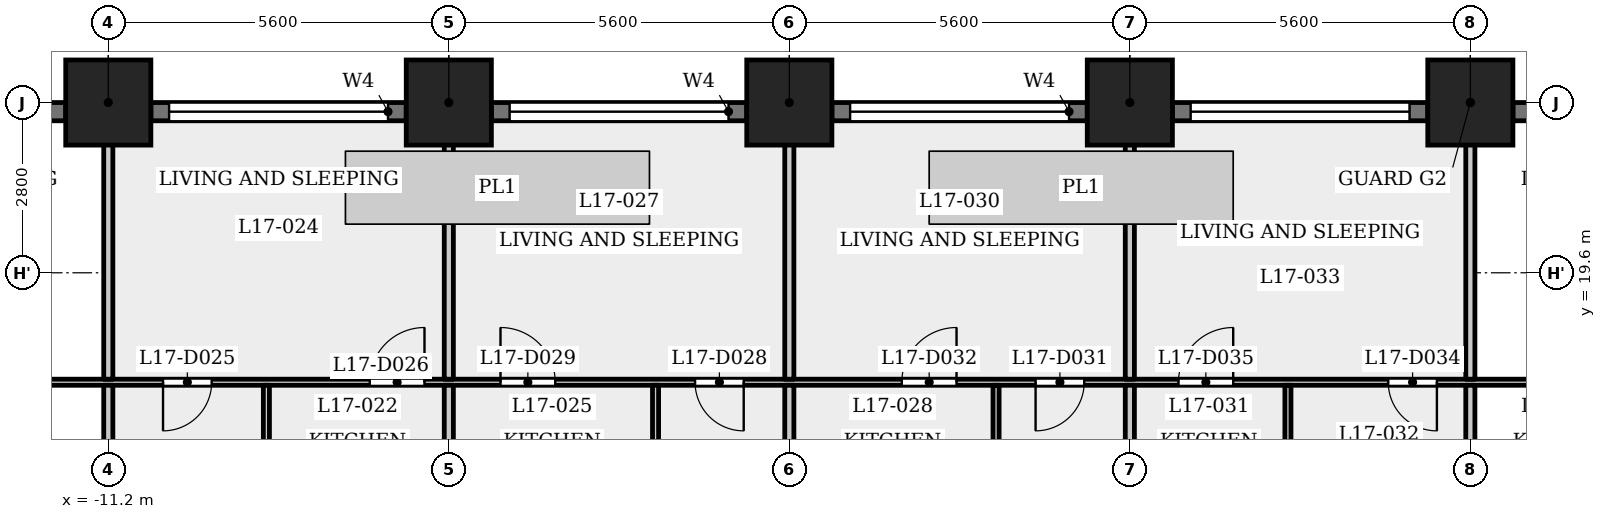
"""IFC4 building model, lengths in metres.
Left out: names, types, materials, properties, quantities, classifications, styles, units other than length and angle.
Written with IfcOpenShell. Run it as: python <this file> out.ifc"""

import sys

from ifc_helpers import new_model, si_unit, direction, frame, frame_2d, origin, origin_2d, place, context, subcontext, project, spatial, rectangle, extrude, element, fill, save


model = new_model("IFC4")
c1 = context("Model", 3, precision=1e-05, world=origin(), true_north=direction((0.0, 1.0)))
c2 = subcontext(c1, "Body", "Model", "MODEL_VIEW")
j1 = project(units=[si_unit("LENGTHUNIT", "METRE"), si_unit("PLANEANGLEUNIT", "RADIAN")], contexts=[c1])
p1 = place(None, origin())
s1 = spatial("IfcSite", under=j1, at=p1, CompositionType="ELEMENT")
p2 = place(p1, origin())
s2 = spatial("IfcBuilding", under=s1, at=p2, CompositionType="ELEMENT")
p3 = place(p2, frame((0.0, 0.0, 69.0)))
s3 = spatial("IfcBuildingStorey", under=s2, at=p3, CompositionType="ELEMENT", Elevation=69.0)
for number, where, z_axis, x_axis in (
    (1, (11.2, 22.4, 0.0), (0.0, 0.0, 1.0), (1.0, 0.0, 0.0)),
    (2, (5.6, 22.4, 0.0), (0.0, 0.0, 1.0), (1.0, 0.0, 0.0)),
    (3, (0.0, 22.4, 0.0), (0.0, 0.0, 1.0), (1.0, 0.0, 0.0)),
    (4, (-5.6, 22.4, 0.0), (0.0, 0.0, 1.0), (1.0, 0.0, 0.0)),
    (5, (-11.2, 22.4, 0.0), (0.0, 0.0, 1.0), (1.0, 0.0, 0.0)),
):
    element("IfcColumn", number, at=place(p3, frame(where, z_axis=z_axis, x_axis=x_axis)), inside=s3, PredefinedType="COLUMN", context=c2, shape_type="SweptSolid", body=[
        extrude(rectangle(XDim=1.4, YDim=1.4, at=origin_2d()), origin(), (0.0, 0.0, 1.0), 3.5),
    ])
p4 = place(p3, frame((16.1, 22.25, 0.0), z_axis=(0.0, 0.0, 1.0), x_axis=(-1.0, 0.0, 0.0)))
e6 = element("IfcWall", 6, at=p4, inside=s3, PredefinedType="SOLIDWALL", context=c2, shape_type="SweptSolid", body=[
    extrude(rectangle(XDim=4.2, YDim=0.3, at=frame_2d((2.1, 0.0))), origin(), (0.0, 0.0, 1.0), 2.3),
])
p5 = place(p4, frame((0.3, 0.0, 1.2)))
e7 = element("IfcOpeningElement", 7, at=p5, cuts=e6, PredefinedType="OPENING", context=c2, shape_type="SweptSolid", body=[
    extrude(rectangle(XDim=3.6, YDim=0.95, at=frame_2d((1.8, 0.475))), frame((0.0, 0.16, 0.0), z_axis=(0.0, -1.0, 0.0), x_axis=(1.0, 0.0, 0.0)), (0.0, 0.0, 1.0), 0.32),
])
p6 = place(p3, frame((10.5, 22.25, 0.0), z_axis=(0.0, 0.0, 1.0), x_axis=(-1.0, 0.0, 0.0)))
e8 = element("IfcWall", 8, at=p6, inside=s3, PredefinedType="SOLIDWALL", context=c2, shape_type="SweptSolid", body=[
    extrude(rectangle(XDim=4.2, YDim=0.3, at=frame_2d((2.1, 0.0))), origin(), (0.0, 0.0, 1.0), 2.3),
])
p7 = place(p6, frame((0.3, 0.0, 1.2)))
e9 = element("IfcOpeningElement", 9, at=p7, cuts=e8, PredefinedType="OPENING", context=c2, shape_type="SweptSolid", body=[
    extrude(rectangle(XDim=3.6, YDim=0.95, at=frame_2d((1.8, 0.475))), frame((0.0, 0.16, 0.0), z_axis=(0.0, -1.0, 0.0), x_axis=(1.0, 0.0, 0.0)), (0.0, 0.0, 1.0), 0.32),
])
p8 = place(p3, frame((4.9, 22.25, 0.0), z_axis=(0.0, 0.0, 1.0), x_axis=(-1.0, 0.0, 0.0)))
e10 = element("IfcWall", 10, at=p8, inside=s3, PredefinedType="SOLIDWALL", context=c2, shape_type="SweptSolid", body=[
    extrude(rectangle(XDim=4.2, YDim=0.3, at=frame_2d((2.1, 0.0))), origin(), (0.0, 0.0, 1.0), 2.3),
])
p9 = place(p8, frame((0.3, 0.0, 1.2)))
e11 = element("IfcOpeningElement", 11, at=p9, cuts=e10, PredefinedType="OPENING", context=c2, shape_type="SweptSolid", body=[
    extrude(rectangle(XDim=3.6, YDim=0.95, at=frame_2d((1.8, 0.475))), frame((0.0, 0.16, 0.0), z_axis=(0.0, -1.0, 0.0), x_axis=(1.0, 0.0, 0.0)), (0.0, 0.0, 1.0), 0.32),
])
p10 = place(p3, frame((-0.7, 22.25, 0.0), z_axis=(0.0, 0.0, 1.0), x_axis=(-1.0, 0.0, 0.0)))
e12 = element("IfcWall", 12, at=p10, inside=s3, PredefinedType="SOLIDWALL", context=c2, shape_type="SweptSolid", body=[
    extrude(rectangle(XDim=4.2, YDim=0.3, at=frame_2d((2.1, 0.0))), origin(), (0.0, 0.0, 1.0), 2.3),
])
p11 = place(p10, frame((0.3, 0.0, 1.2)))
e13 = element("IfcOpeningElement", 13, at=p11, cuts=e12, PredefinedType="OPENING", context=c2, shape_type="SweptSolid", body=[
    extrude(rectangle(XDim=3.6, YDim=0.95, at=frame_2d((1.8, 0.475))), frame((0.0, 0.16, 0.0), z_axis=(0.0, -1.0, 0.0), x_axis=(1.0, 0.0, 0.0)), (0.0, 0.0, 1.0), 0.32),
])
p12 = place(p3, frame((-6.3, 22.25, 0.0), z_axis=(0.0, 0.0, 1.0), x_axis=(-1.0, 0.0, 0.0)))
e14 = element("IfcWall", 14, at=p12, inside=s3, PredefinedType="SOLIDWALL", context=c2, shape_type="SweptSolid", body=[
    extrude(rectangle(XDim=4.2, YDim=0.3, at=frame_2d((2.1, 0.0))), origin(), (0.0, 0.0, 1.0), 2.3),
])
p13 = place(p12, frame((0.3, 0.0, 1.2)))
e15 = element("IfcOpeningElement", 15, at=p13, cuts=e14, PredefinedType="OPENING", context=c2, shape_type="SweptSolid", body=[
    extrude(rectangle(XDim=3.6, YDim=0.95, at=frame_2d((1.8, 0.475))), frame((0.0, 0.16, 0.0), z_axis=(0.0, -1.0, 0.0), x_axis=(1.0, 0.0, 0.0)), (0.0, 0.0, 1.0), 0.32),
])
p14 = place(p3, frame((-11.9, 22.25, 0.0), z_axis=(0.0, 0.0, 1.0), x_axis=(-1.0, 0.0, 0.0)))
e16 = element("IfcWall", 16, at=p14, inside=s3, PredefinedType="SOLIDWALL", context=c2, shape_type="SweptSolid", body=[
    extrude(rectangle(XDim=4.2, YDim=0.3, at=frame_2d((2.1, 0.0))), origin(), (0.0, 0.0, 1.0), 2.3),
])
p15 = place(p14, frame((0.3, 0.0, 1.2)))
e17 = element("IfcOpeningElement", 17, at=p15, cuts=e16, PredefinedType="OPENING", context=c2, shape_type="SweptSolid", body=[
    extrude(rectangle(XDim=3.6, YDim=0.95, at=frame_2d((1.8, 0.475))), frame((0.0, 0.16, 0.0), z_axis=(0.0, -1.0, 0.0), x_axis=(1.0, 0.0, 0.0)), (0.0, 0.0, 1.0), 0.32),
])
p16 = place(p3, frame((-26.64, 17.8, 0.0), z_axis=(0.0, 0.0, 1.0), x_axis=(1.0, 0.0, 0.0)))
e18 = element("IfcWall", 18, at=p16, inside=s3, PredefinedType="PARTITIONING", context=c2, shape_type="SweptSolid", body=[
    extrude(rectangle(XDim=53.034, YDim=0.1, at=frame_2d((26.517, 0.0))), origin(), (0.0, 0.0, 1.0), 3.15),
])
p17 = place(p16, frame((2.872, 0.0, 0.0)))
e19 = element("IfcOpeningElement", 19, at=p17, cuts=e18, PredefinedType="OPENING", context=c2, shape_type="SweptSolid", body=[
    extrude(rectangle(XDim=0.8, YDim=2.1, at=frame_2d((0.4, 1.05))), frame((0.0, 0.06, 0.0), z_axis=(0.0, -1.0, 0.0), x_axis=(1.0, 0.0, 0.0)), (0.0, 0.0, 1.0), 0.12),
])
p18 = place(p16, frame((7.04, 0.0, 0.0)))
e20 = element("IfcOpeningElement", 20, at=p18, cuts=e18, PredefinedType="OPENING", context=c2, shape_type="SweptSolid", body=[
    extrude(rectangle(XDim=0.9, YDim=2.1, at=frame_2d((0.45, 1.05))), frame((0.0, 0.06, 0.0), z_axis=(0.0, -1.0, 0.0), x_axis=(1.0, 0.0, 0.0)), (0.0, 0.0, 1.0), 0.12),
])
p19 = place(p16, frame((10.74, 0.0, 0.0)))
e21 = element("IfcOpeningElement", 21, at=p19, cuts=e18, PredefinedType="OPENING", context=c2, shape_type="SweptSolid", body=[
    extrude(rectangle(XDim=0.8, YDim=2.1, at=frame_2d((0.4, 1.05))), frame((0.0, 0.06, 0.0), z_axis=(0.0, -1.0, 0.0), x_axis=(1.0, 0.0, 0.0)), (0.0, 0.0, 1.0), 0.12),
])
p20 = place(p16, frame((12.89, 0.0, 0.0)))
e22 = element("IfcOpeningElement", 22, at=p20, cuts=e18, PredefinedType="OPENING", context=c2, shape_type="SweptSolid", body=[
    extrude(rectangle(XDim=0.9, YDim=2.1, at=frame_2d((0.45, 1.05))), frame((0.0, 0.06, 0.0), z_axis=(0.0, -1.0, 0.0), x_axis=(1.0, 0.0, 0.0)), (0.0, 0.0, 1.0), 0.12),
])
p21 = place(p16, frame((16.34, 0.0, 0.0)))
e23 = element("IfcOpeningElement", 23, at=p21, cuts=e18, PredefinedType="OPENING", context=c2, shape_type="SweptSolid", body=[
    extrude(rectangle(XDim=0.8, YDim=2.1, at=frame_2d((0.4, 1.05))), frame((0.0, 0.06, 0.0), z_axis=(0.0, -1.0, 0.0), x_axis=(1.0, 0.0, 0.0)), (0.0, 0.0, 1.0), 0.12),
])
p22 = place(p16, frame((19.74, 0.0, 0.0)))
e24 = element("IfcOpeningElement", 24, at=p22, cuts=e18, PredefinedType="OPENING", context=c2, shape_type="SweptSolid", body=[
    extrude(rectangle(XDim=0.9, YDim=2.1, at=frame_2d((0.45, 1.05))), frame((0.0, 0.06, 0.0), z_axis=(0.0, -1.0, 0.0), x_axis=(1.0, 0.0, 0.0)), (0.0, 0.0, 1.0), 0.12),
])
p23 = place(p16, frame((25.09, 0.0, 0.0)))
e25 = element("IfcOpeningElement", 25, at=p23, cuts=e18, PredefinedType="OPENING", context=c2, shape_type="SweptSolid", body=[
    extrude(rectangle(XDim=0.8, YDim=2.1, at=frame_2d((0.4, 1.05))), frame((0.0, 0.06, 0.0), z_axis=(0.0, -1.0, 0.0), x_axis=(1.0, 0.0, 0.0)), (0.0, 0.0, 1.0), 0.12),
])
p24 = place(p16, frame((21.89, 0.0, 0.0)))
e26 = element("IfcOpeningElement", 26, at=p24, cuts=e18, PredefinedType="OPENING", context=c2, shape_type="SweptSolid", body=[
    extrude(rectangle(XDim=0.9, YDim=2.1, at=frame_2d((0.45, 1.05))), frame((0.0, 0.06, 0.0), z_axis=(0.0, -1.0, 0.0), x_axis=(1.0, 0.0, 0.0)), (0.0, 0.0, 1.0), 0.12),
])
p25 = place(p16, frame((30.69, 0.0, 0.0)))
e27 = element("IfcOpeningElement", 27, at=p25, cuts=e18, PredefinedType="OPENING", context=c2, shape_type="SweptSolid", body=[
    extrude(rectangle(XDim=0.8, YDim=2.1, at=frame_2d((0.4, 1.05))), frame((0.0, 0.06, 0.0), z_axis=(0.0, -1.0, 0.0), x_axis=(1.0, 0.0, 0.0)), (0.0, 0.0, 1.0), 0.12),
])
p26 = place(p16, frame((28.49, 0.0, 0.0)))
e28 = element("IfcOpeningElement", 28, at=p26, cuts=e18, PredefinedType="OPENING", context=c2, shape_type="SweptSolid", body=[
    extrude(rectangle(XDim=0.9, YDim=2.1, at=frame_2d((0.45, 1.05))), frame((0.0, 0.06, 0.0), z_axis=(0.0, -1.0, 0.0), x_axis=(1.0, 0.0, 0.0)), (0.0, 0.0, 1.0), 0.12),
])
p27 = place(p16, frame((36.49, 0.0, 0.0)))
e29 = element("IfcOpeningElement", 29, at=p27, cuts=e18, PredefinedType="OPENING", context=c2, shape_type="SweptSolid", body=[
    extrude(rectangle(XDim=0.8, YDim=2.1, at=frame_2d((0.4, 1.05))), frame((0.0, 0.06, 0.0), z_axis=(0.0, -1.0, 0.0), x_axis=(1.0, 0.0, 0.0)), (0.0, 0.0, 1.0), 0.12),
])
p28 = place(p16, frame((33.04, 0.0, 0.0)))
e30 = element("IfcOpeningElement", 30, at=p28, cuts=e18, PredefinedType="OPENING", context=c2, shape_type="SweptSolid", body=[
    extrude(rectangle(XDim=0.9, YDim=2.1, at=frame_2d((0.45, 1.05))), frame((0.0, 0.06, 0.0), z_axis=(0.0, -1.0, 0.0), x_axis=(1.0, 0.0, 0.0)), (0.0, 0.0, 1.0), 0.12),
])
p29 = place(p16, frame((41.49, 0.0, 0.0)))
e31 = element("IfcOpeningElement", 31, at=p29, cuts=e18, PredefinedType="OPENING", context=c2, shape_type="SweptSolid", body=[
    extrude(rectangle(XDim=0.8, YDim=2.1, at=frame_2d((0.4, 1.05))), frame((0.0, 0.06, 0.0), z_axis=(0.0, -1.0, 0.0), x_axis=(1.0, 0.0, 0.0)), (0.0, 0.0, 1.0), 0.12),
])
p30 = place(p16, frame((39.79, 0.0, 0.0)))
e32 = element("IfcOpeningElement", 32, at=p30, cuts=e18, PredefinedType="OPENING", context=c2, shape_type="SweptSolid", body=[
    extrude(rectangle(XDim=0.9, YDim=2.1, at=frame_2d((0.45, 1.05))), frame((0.0, 0.06, 0.0), z_axis=(0.0, -1.0, 0.0), x_axis=(1.0, 0.0, 0.0)), (0.0, 0.0, 1.0), 0.12),
])
p31 = place(p16, frame((51.44, 0.0, 0.0)))
e33 = element("IfcOpeningElement", 33, at=p31, cuts=e18, PredefinedType="OPENING", context=c2, shape_type="SweptSolid", body=[
    extrude(rectangle(XDim=0.8, YDim=2.1, at=frame_2d((0.4, 1.05))), frame((0.0, 0.06, 0.0), z_axis=(0.0, -1.0, 0.0), x_axis=(1.0, 0.0, 0.0)), (0.0, 0.0, 1.0), 0.12),
])
p32 = place(p16, frame((46.49, 0.0, 0.0)))
e34 = element("IfcOpeningElement", 34, at=p32, cuts=e18, PredefinedType="OPENING", context=c2, shape_type="SweptSolid", body=[
    extrude(rectangle(XDim=0.9, YDim=2.1, at=frame_2d((0.45, 1.05))), frame((0.0, 0.06, 0.0), z_axis=(0.0, -1.0, 0.0), x_axis=(1.0, 0.0, 0.0)), (0.0, 0.0, 1.0), 0.12),
])
p33 = place(p3, frame((-11.2, 15.475, 0.0), z_axis=(0.0, 0.0, 1.0), x_axis=(0.0, 1.0, 0.0)))
e35 = element("IfcWall", 35, at=p33, inside=s3, PredefinedType="PARTITIONING", context=c2, shape_type="SweptSolid", body=[
    extrude(rectangle(XDim=2.275, YDim=0.15, at=frame_2d((1.137, 0.0))), origin(), (0.0, 0.0, 1.0), 3.15),
])
p34 = place(p3, frame((-11.2, 17.85, 0.0), z_axis=(0.0, 0.0, 1.0), x_axis=(0.0, 1.0, 0.0)))
e36 = element("IfcWall", 36, at=p34, inside=s3, PredefinedType="PARTITIONING", context=c2, shape_type="SweptSolid", body=[
    extrude(rectangle(XDim=5.23, YDim=0.15, at=frame_2d((2.615, 0.0))), origin(), (0.0, 0.0, 1.0), 3.15),
])
p35 = place(p3, frame((-8.6, 15.475, 0.0), z_axis=(0.0, 0.0, 1.0), x_axis=(0.0, 1.0, 0.0)))
e37 = element("IfcWall", 37, at=p35, inside=s3, PredefinedType="PARTITIONING", context=c2, shape_type="SweptSolid", body=[
    extrude(rectangle(XDim=2.275, YDim=0.1, at=frame_2d((1.137, 0.0))), origin(), (0.0, 0.0, 1.0), 3.15),
])
p36 = place(p3, frame((-5.6, 15.475, 0.0), z_axis=(0.0, 0.0, 1.0), x_axis=(0.0, 1.0, 0.0)))
e38 = element("IfcWall", 38, at=p36, inside=s3, PredefinedType="PARTITIONING", context=c2, shape_type="SweptSolid", body=[
    extrude(rectangle(XDim=2.275, YDim=0.15, at=frame_2d((1.137, 0.0))), origin(), (0.0, 0.0, 1.0), 3.15),
])
p37 = place(p3, frame((-5.6, 17.85, 0.0), z_axis=(0.0, 0.0, 1.0), x_axis=(0.0, 1.0, 0.0)))
e39 = element("IfcWall", 39, at=p37, inside=s3, PredefinedType="PARTITIONING", context=c2, shape_type="SweptSolid", body=[
    extrude(rectangle(XDim=5.23, YDim=0.15, at=frame_2d((2.615, 0.0))), origin(), (0.0, 0.0, 1.0), 3.15),
])
p38 = place(p3, frame((-2.2, 15.475, 0.0), z_axis=(0.0, 0.0, 1.0), x_axis=(0.0, 1.0, 0.0)))
e40 = element("IfcWall", 40, at=p38, inside=s3, PredefinedType="PARTITIONING", context=c2, shape_type="SweptSolid", body=[
    extrude(rectangle(XDim=2.275, YDim=0.1, at=frame_2d((1.137, 0.0))), origin(), (0.0, 0.0, 1.0), 3.15),
])
p39 = place(p3, frame((0.0, 15.475, 0.0), z_axis=(0.0, 0.0, 1.0), x_axis=(0.0, 1.0, 0.0)))
e41 = element("IfcWall", 41, at=p39, inside=s3, PredefinedType="PARTITIONING", context=c2, shape_type="SweptSolid", body=[
    extrude(rectangle(XDim=2.275, YDim=0.15, at=frame_2d((1.137, 0.0))), origin(), (0.0, 0.0, 1.0), 3.15),
])
p40 = place(p3, frame((0.0, 17.85, 0.0), z_axis=(0.0, 0.0, 1.0), x_axis=(0.0, 1.0, 0.0)))
e42 = element("IfcWall", 42, at=p40, inside=s3, PredefinedType="PARTITIONING", context=c2, shape_type="SweptSolid", body=[
    extrude(rectangle(XDim=5.23, YDim=0.15, at=frame_2d((2.615, 0.0))), origin(), (0.0, 0.0, 1.0), 3.15),
])
p41 = place(p3, frame((3.4, 15.475, 0.0), z_axis=(0.0, 0.0, 1.0), x_axis=(0.0, 1.0, 0.0)))
e43 = element("IfcWall", 43, at=p41, inside=s3, PredefinedType="PARTITIONING", context=c2, shape_type="SweptSolid", body=[
    extrude(rectangle(XDim=2.275, YDim=0.1, at=frame_2d((1.137, 0.0))), origin(), (0.0, 0.0, 1.0), 3.15),
])
p42 = place(p3, frame((5.6, 15.475, 0.0), z_axis=(0.0, 0.0, 1.0), x_axis=(0.0, 1.0, 0.0)))
e44 = element("IfcWall", 44, at=p42, inside=s3, PredefinedType="PARTITIONING", context=c2, shape_type="SweptSolid", body=[
    extrude(rectangle(XDim=2.275, YDim=0.15, at=frame_2d((1.137, 0.0))), origin(), (0.0, 0.0, 1.0), 3.15),
])
p43 = place(p3, frame((5.6, 17.85, 0.0), z_axis=(0.0, 0.0, 1.0), x_axis=(0.0, 1.0, 0.0)))
e45 = element("IfcWall", 45, at=p43, inside=s3, PredefinedType="PARTITIONING", context=c2, shape_type="SweptSolid", body=[
    extrude(rectangle(XDim=5.23, YDim=0.15, at=frame_2d((2.615, 0.0))), origin(), (0.0, 0.0, 1.0), 3.15),
])
p44 = place(p3, frame((8.2, 15.475, 0.0), z_axis=(0.0, 0.0, 1.0), x_axis=(0.0, 1.0, 0.0)))
e46 = element("IfcWall", 46, at=p44, inside=s3, PredefinedType="PARTITIONING", context=c2, shape_type="SweptSolid", body=[
    extrude(rectangle(XDim=2.275, YDim=0.1, at=frame_2d((1.137, 0.0))), origin(), (0.0, 0.0, 1.0), 3.15),
])
p45 = place(p3, frame((11.2, 15.475, 0.0), z_axis=(0.0, 0.0, 1.0), x_axis=(0.0, 1.0, 0.0)))
e47 = element("IfcWall", 47, at=p45, inside=s3, PredefinedType="PARTITIONING", context=c2, shape_type="SweptSolid", body=[
    extrude(rectangle(XDim=2.275, YDim=0.15, at=frame_2d((1.137, 0.0))), origin(), (0.0, 0.0, 1.0), 3.15),
])
p46 = place(p3, frame((11.2, 17.85, 0.0), z_axis=(0.0, 0.0, 1.0), x_axis=(0.0, 1.0, 0.0)))
e48 = element("IfcWall", 48, at=p46, inside=s3, PredefinedType="PARTITIONING", context=c2, shape_type="SweptSolid", body=[
    extrude(rectangle(XDim=5.23, YDim=0.15, at=frame_2d((2.615, 0.0))), origin(), (0.0, 0.0, 1.0), 3.15),
])
p47 = place(p21, origin())
e49 = element("IfcDoor", 49, at=p47, inside=s3, OperationType="SINGLE_SWING_LEFT", PredefinedType="DOOR", context=c2, shape_type="SweptSolid", body=[
    extrude(rectangle(XDim=0.8, YDim=2.1, at=frame_2d((0.4, 1.05))), frame((0.0, 0.025, 0.0), z_axis=(0.0, -1.0, 0.0), x_axis=(1.0, 0.0, 0.0)), (0.0, 0.0, 1.0), 0.05),
])
fill(e23, e49)
p48 = place(p22, origin())
e50 = element("IfcDoor", 50, at=p48, inside=s3, OperationType="SINGLE_SWING_LEFT", PredefinedType="DOOR", context=c2, shape_type="SweptSolid", body=[
    extrude(rectangle(XDim=0.9, YDim=2.1, at=frame_2d((0.45, 1.05))), frame((0.0, 0.025, 0.0), z_axis=(0.0, -1.0, 0.0), x_axis=(1.0, 0.0, 0.0)), (0.0, 0.0, 1.0), 0.05),
])
fill(e24, e50)
p49 = place(p23, origin())
e51 = element("IfcDoor", 51, at=p49, inside=s3, OperationType="SINGLE_SWING_RIGHT", PredefinedType="DOOR", context=c2, shape_type="SweptSolid", body=[
    extrude(rectangle(XDim=0.8, YDim=2.1, at=frame_2d((0.4, 1.05))), frame((0.0, 0.025, 0.0), z_axis=(0.0, -1.0, 0.0), x_axis=(1.0, 0.0, 0.0)), (0.0, 0.0, 1.0), 0.05),
])
fill(e25, e51)
p50 = place(p24, origin())
e52 = element("IfcDoor", 52, at=p50, inside=s3, OperationType="SINGLE_SWING_RIGHT", PredefinedType="DOOR", context=c2, shape_type="SweptSolid", body=[
    extrude(rectangle(XDim=0.9, YDim=2.1, at=frame_2d((0.45, 1.05))), frame((0.0, 0.025, 0.0), z_axis=(0.0, -1.0, 0.0), x_axis=(1.0, 0.0, 0.0)), (0.0, 0.0, 1.0), 0.05),
])
fill(e26, e52)
p51 = place(p25, origin())
e53 = element("IfcDoor", 53, at=p51, inside=s3, OperationType="SINGLE_SWING_LEFT", PredefinedType="DOOR", context=c2, shape_type="SweptSolid", body=[
    extrude(rectangle(XDim=0.8, YDim=2.1, at=frame_2d((0.4, 1.05))), frame((0.0, 0.025, 0.0), z_axis=(0.0, -1.0, 0.0), x_axis=(1.0, 0.0, 0.0)), (0.0, 0.0, 1.0), 0.05),
])
fill(e27, e53)
p52 = place(p26, origin())
e54 = element("IfcDoor", 54, at=p52, inside=s3, OperationType="SINGLE_SWING_LEFT", PredefinedType="DOOR", context=c2, shape_type="SweptSolid", body=[
    extrude(rectangle(XDim=0.9, YDim=2.1, at=frame_2d((0.45, 1.05))), frame((0.0, 0.025, 0.0), z_axis=(0.0, -1.0, 0.0), x_axis=(1.0, 0.0, 0.0)), (0.0, 0.0, 1.0), 0.05),
])
fill(e28, e54)
p53 = place(p27, origin())
e55 = element("IfcDoor", 55, at=p53, inside=s3, OperationType="SINGLE_SWING_RIGHT", PredefinedType="DOOR", context=c2, shape_type="SweptSolid", body=[
    extrude(rectangle(XDim=0.8, YDim=2.1, at=frame_2d((0.4, 1.05))), frame((0.0, 0.025, 0.0), z_axis=(0.0, -1.0, 0.0), x_axis=(1.0, 0.0, 0.0)), (0.0, 0.0, 1.0), 0.05),
])
fill(e29, e55)
p54 = place(p28, origin())
e56 = element("IfcDoor", 56, at=p54, inside=s3, OperationType="SINGLE_SWING_LEFT", PredefinedType="DOOR", context=c2, shape_type="SweptSolid", body=[
    extrude(rectangle(XDim=0.9, YDim=2.1, at=frame_2d((0.45, 1.05))), frame((0.0, 0.025, 0.0), z_axis=(0.0, -1.0, 0.0), x_axis=(1.0, 0.0, 0.0)), (0.0, 0.0, 1.0), 0.05),
])
fill(e30, e56)
p55 = place(p7, origin())
e57 = element("IfcWindow", 57, at=p55, inside=s3, PartitioningType="SINGLE_PANEL", PredefinedType="WINDOW", context=c2, shape_type="SweptSolid", body=[
    extrude(rectangle(XDim=3.6, YDim=0.95, at=frame_2d((1.8, 0.475))), frame((0.0, 0.03, 0.0), z_axis=(0.0, -1.0, 0.0), x_axis=(1.0, 0.0, 0.0)), (0.0, 0.0, 1.0), 0.06),
])
fill(e9, e57)
p56 = place(p9, origin())
e58 = element("IfcWindow", 58, at=p56, inside=s3, PartitioningType="SINGLE_PANEL", PredefinedType="WINDOW", context=c2, shape_type="SweptSolid", body=[
    extrude(rectangle(XDim=3.6, YDim=0.95, at=frame_2d((1.8, 0.475))), frame((0.0, 0.03, 0.0), z_axis=(0.0, -1.0, 0.0), x_axis=(1.0, 0.0, 0.0)), (0.0, 0.0, 1.0), 0.06),
])
fill(e11, e58)
p57 = place(p11, origin())
e59 = element("IfcWindow", 59, at=p57, inside=s3, PartitioningType="SINGLE_PANEL", PredefinedType="WINDOW", context=c2, shape_type="SweptSolid", body=[
    extrude(rectangle(XDim=3.6, YDim=0.95, at=frame_2d((1.8, 0.475))), frame((0.0, 0.03, 0.0), z_axis=(0.0, -1.0, 0.0), x_axis=(1.0, 0.0, 0.0)), (0.0, 0.0, 1.0), 0.06),
])
fill(e13, e59)
p58 = place(p13, origin())
e60 = element("IfcWindow", 60, at=p58, inside=s3, PartitioningType="SINGLE_PANEL", PredefinedType="WINDOW", context=c2, shape_type="SweptSolid", body=[
    extrude(rectangle(XDim=3.6, YDim=0.95, at=frame_2d((1.8, 0.475))), frame((0.0, 0.03, 0.0), z_axis=(0.0, -1.0, 0.0), x_axis=(1.0, 0.0, 0.0)), (0.0, 0.0, 1.0), 0.06),
])
fill(e15, e60)
save(model, sys.argv[1])
